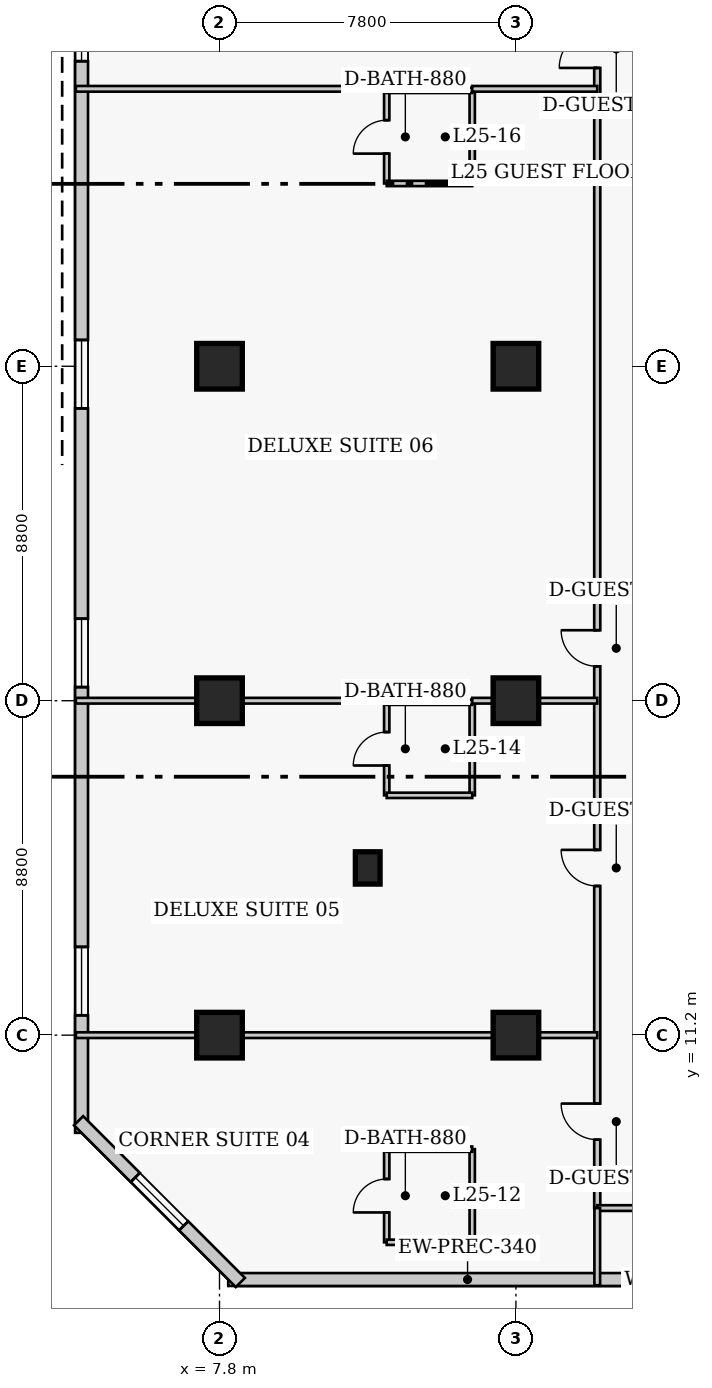
"""IFC4 building model, lengths in metres.
Left out: names, types, materials, properties, quantities, classifications, styles, units other than length and angle.
Written with IfcOpenShell. Run it as: python <this file> out.ifc"""

import sys

from ifc_helpers import new_model, si_unit, direction, frame, frame_2d, origin, origin_2d, place, context, subcontext, project, spatial, rectangle, extrude, element, fill, save


model = new_model("IFC4")
c1 = context("Model", 3, precision=1e-05, world=origin(), true_north=direction((0.0, 1.0)))
c2 = subcontext(c1, "Body", "Model", "MODEL_VIEW")
j1 = project(units=[si_unit("LENGTHUNIT", "METRE"), si_unit("PLANEANGLEUNIT", "RADIAN")], contexts=[c1])
p1 = place(None, origin())
s1 = spatial("IfcSite", under=j1, at=p1, CompositionType="ELEMENT")
p2 = place(p1, origin())
s2 = spatial("IfcBuilding", under=s1, at=p2, CompositionType="ELEMENT")
p3 = place(p2, frame((0.0, 0.0, 103.2)))
s3 = spatial("IfcBuildingStorey", under=s2, at=p3, CompositionType="ELEMENT", Elevation=103.2)
for number, where, z_axis, x_axis in (
    (1, (7.8, 11.2, 0.0), (0.0, 0.0, 1.0), (1.0, 0.0, 0.0)),
    (2, (7.8, 20.0, 0.0), (0.0, 0.0, 1.0), (1.0, 0.0, 0.0)),
    (3, (7.8, 28.8, 0.0), (0.0, 0.0, 1.0), (1.0, 0.0, 0.0)),
    (4, (15.6, 11.2, 0.0), (0.0, 0.0, 1.0), (1.0, 0.0, 0.0)),
    (5, (15.6, 20.0, 0.0), (0.0, 0.0, 1.0), (1.0, 0.0, 0.0)),
    (6, (15.6, 28.8, 0.0), (0.0, 0.0, 1.0), (1.0, 0.0, 0.0)),
):
    element("IfcColumn", number, at=place(p3, frame(where, z_axis=z_axis, x_axis=x_axis)), inside=s3, PredefinedType="COLUMN", context=c2, shape_type="SweptSolid", body=[
        extrude(rectangle(XDim=1.2, YDim=1.2, at=origin_2d()), origin(), (0.0, 0.0, 1.0), 3.8),
    ])
p4 = place(p3, frame((11.7, 15.6, 0.0), z_axis=(0.0, 0.0, 1.0), x_axis=(1.0, 0.0, 0.0)))
e7 = element("IfcColumn", 7, at=p4, inside=s3, PredefinedType="PILASTER", context=c2, shape_type="SweptSolid", body=[
    extrude(rectangle(XDim=0.65, YDim=0.85, at=origin_2d()), origin(), (0.0, 0.0, 1.0), 3.8),
])
p5 = place(p3, frame((8.03, 4.77, 0.0), z_axis=(0.0, 0.0, 1.0), x_axis=(1.0, 0.0, 0.0)))
e8 = element("IfcWall", 8, at=p5, inside=s3, PredefinedType="SOLIDWALL", context=c2, shape_type="SweptSolid", body=[
    extrude(rectangle(XDim=28.29, YDim=0.34, at=frame_2d((14.145, 0.0))), origin(), (0.0, 0.0, 1.0), 3.54),
])
p6 = place(p5, frame((18.57, 0.0, 0.0)))
e9 = element("IfcOpeningElement", 9, at=p6, cuts=e8, PredefinedType="OPENING", context=c2, shape_type="SweptSolid", body=[
    extrude(rectangle(XDim=1.4, YDim=2.15, at=frame_2d((0.7, 1.075))), frame((0.0, 0.18, 0.0), z_axis=(0.0, -1.0, 0.0), x_axis=(1.0, 0.0, 0.0)), (0.0, 0.0, 1.0), 0.36),
])
p7 = place(p5, frame((12.595, 0.0, 0.85)))
e10 = element("IfcOpeningElement", 10, at=p7, cuts=e8, PredefinedType="OPENING", context=c2, shape_type="SweptSolid", body=[
    extrude(rectangle(XDim=1.8, YDim=1.8, at=frame_2d((0.9, 0.9))), frame((0.0, 0.18, 0.0), z_axis=(0.0, -1.0, 0.0), x_axis=(1.0, 0.0, 0.0)), (0.0, 0.0, 1.0), 0.36),
])
p8 = place(p3, frame((4.17, 40.57, 0.0), z_axis=(0.0, 0.0, 1.0), x_axis=(0.0, -1.0, 0.0)))
e11 = element("IfcWall", 11, at=p8, inside=s3, PredefinedType="SOLIDWALL", context=c2, shape_type="SweptSolid", body=[
    extrude(rectangle(XDim=31.94, YDim=0.34, at=frame_2d((15.97, 0.0))), origin(), (0.0, 0.0, 1.0), 3.54),
])
p9 = place(p8, frame((1.942, 0.0, 0.85)))
e12 = element("IfcOpeningElement", 12, at=p9, cuts=e11, PredefinedType="OPENING", context=c2, shape_type="SweptSolid", body=[
    extrude(rectangle(XDim=1.8, YDim=1.8, at=frame_2d((0.9, 0.9))), frame((0.0, 0.18, 0.0), z_axis=(0.0, -1.0, 0.0), x_axis=(1.0, 0.0, 0.0)), (0.0, 0.0, 1.0), 0.36),
])
p10 = place(p8, frame((11.077, 0.0, 0.85)))
e13 = element("IfcOpeningElement", 13, at=p10, cuts=e11, PredefinedType="OPENING", context=c2, shape_type="SweptSolid", body=[
    extrude(rectangle(XDim=1.8, YDim=1.8, at=frame_2d((0.9, 0.9))), frame((0.0, 0.18, 0.0), z_axis=(0.0, -1.0, 0.0), x_axis=(1.0, 0.0, 0.0)), (0.0, 0.0, 1.0), 0.36),
])
p11 = place(p8, frame((18.413, 0.0, 0.85)))
e14 = element("IfcOpeningElement", 14, at=p11, cuts=e11, PredefinedType="OPENING", context=c2, shape_type="SweptSolid", body=[
    extrude(rectangle(XDim=1.8, YDim=1.8, at=frame_2d((0.9, 0.9))), frame((0.0, 0.18, 0.0), z_axis=(0.0, -1.0, 0.0), x_axis=(1.0, 0.0, 0.0)), (0.0, 0.0, 1.0), 0.36),
])
p12 = place(p8, frame((27.048, 0.0, 0.85)))
e15 = element("IfcOpeningElement", 15, at=p12, cuts=e11, PredefinedType="OPENING", context=c2, shape_type="SweptSolid", body=[
    extrude(rectangle(XDim=1.8, YDim=1.8, at=frame_2d((0.9, 0.9))), frame((0.0, 0.18, 0.0), z_axis=(0.0, -1.0, 0.0), x_axis=(1.0, 0.0, 0.0)), (0.0, 0.0, 1.0), 0.36),
])
p13 = place(p3, frame((4.092, 8.948, 0.0), z_axis=(0.0, 0.0, 1.0), x_axis=(0.707106781187, -0.707106781187, 0.0)))
e16 = element("IfcWall", 16, at=p13, inside=s3, PredefinedType="SOLIDWALL", context=c2, shape_type="SweptSolid", body=[
    extrude(rectangle(XDim=6.02, YDim=0.34, at=frame_2d((3.01, 0.0))), origin(), (0.0, 0.0, 1.0), 3.54),
])
p14 = place(p13, frame((2.11, 0.0, 0.85)))
e17 = element("IfcOpeningElement", 17, at=p14, cuts=e16, PredefinedType="OPENING", context=c2, shape_type="SweptSolid", body=[
    extrude(rectangle(XDim=1.8, YDim=1.8, at=frame_2d((0.9, 0.9))), frame((0.0, 0.18, 0.0), z_axis=(0.0, -1.0, 0.0), x_axis=(1.0, 0.0, 0.0)), (0.0, 0.0, 1.0), 0.36),
])
p15 = place(p3, frame((17.74, 6.65, 0.0), z_axis=(0.0, 0.0, 1.0), x_axis=(0.0, 1.0, 0.0)))
e18 = element("IfcWall", 18, at=p15, inside=s3, PredefinedType="PARTITIONING", context=c2, shape_type="SweptSolid", body=[
    extrude(rectangle(XDim=34.0, YDim=0.16, at=frame_2d((17.0, 0.0))), origin(), (0.0, 0.0, 1.0), 3.54),
])
p16 = place(p15, frame((1.8, 0.0, 0.0)))
e19 = element("IfcOpeningElement", 19, at=p16, cuts=e18, PredefinedType="OPENING", context=c2, shape_type="SweptSolid", body=[
    extrude(rectangle(XDim=0.95, YDim=2.1, at=frame_2d((0.475, 1.05))), frame((0.0, 0.09, 0.0), z_axis=(0.0, -1.0, 0.0), x_axis=(1.0, 0.0, 0.0)), (0.0, 0.0, 1.0), 0.18),
])
p17 = place(p15, frame((8.475, 0.0, 0.0)))
e20 = element("IfcOpeningElement", 20, at=p17, cuts=e18, PredefinedType="OPENING", context=c2, shape_type="SweptSolid", body=[
    extrude(rectangle(XDim=0.95, YDim=2.1, at=frame_2d((0.475, 1.05))), frame((0.0, 0.09, 0.0), z_axis=(0.0, -1.0, 0.0), x_axis=(1.0, 0.0, 0.0)), (0.0, 0.0, 1.0), 0.18),
])
p18 = place(p15, frame((14.255, 0.0, 0.0)))
e21 = element("IfcOpeningElement", 21, at=p18, cuts=e18, PredefinedType="OPENING", context=c2, shape_type="SweptSolid", body=[
    extrude(rectangle(XDim=0.95, YDim=2.1, at=frame_2d((0.475, 1.05))), frame((0.0, 0.09, 0.0), z_axis=(0.0, -1.0, 0.0), x_axis=(1.0, 0.0, 0.0)), (0.0, 0.0, 1.0), 0.18),
])
p19 = place(p15, frame((30.0, 0.0, 0.0)))
e22 = element("IfcOpeningElement", 22, at=p19, cuts=e18, PredefinedType="OPENING", context=c2, shape_type="SweptSolid", body=[
    extrude(rectangle(XDim=1.0, YDim=2.15, at=frame_2d((0.5, 1.075))), frame((0.0, 0.09, 0.0), z_axis=(0.0, -1.0, 0.0), x_axis=(1.0, 0.0, 0.0)), (0.0, 0.0, 1.0), 0.18),
])
p20 = place(p3, frame((17.74, 6.65, 0.0), z_axis=(0.0, 0.0, 1.0), x_axis=(1.0, 0.0, 0.0)))
e23 = element("IfcWall", 23, at=p20, inside=s3, PredefinedType="PARTITIONING", context=c2, shape_type="SweptSolid", body=[
    extrude(rectangle(XDim=2.22, YDim=0.15, at=frame_2d((1.11, 0.0))), origin(), (0.0, 0.0, 1.0), 3.54),
])
p21 = place(p3, frame((17.74, 4.62, 0.0), z_axis=(0.0, 0.0, 1.0), x_axis=(0.0, 1.0, 0.0)))
e24 = element("IfcWall", 24, at=p21, inside=s3, PredefinedType="PARTITIONING", context=c2, shape_type="SweptSolid", body=[
    extrude(rectangle(XDim=2.03, YDim=0.15, at=frame_2d((1.015, 0.0))), origin(), (0.0, 0.0, 1.0), 3.54),
])
p22 = place(p3, frame((12.2, 5.75, 0.0), z_axis=(0.0, 0.0, 1.0), x_axis=(0.0, 1.0, 0.0)))
e25 = element("IfcWall", 25, at=p22, inside=s3, PredefinedType="PLUMBINGWALL", context=c2, shape_type="SweptSolid", body=[
    extrude(rectangle(XDim=2.45, YDim=0.14, at=frame_2d((1.225, 0.0))), origin(), (0.0, 0.0, 1.0), 3.54),
])
p23 = place(p22, frame((0.785, 0.0, 0.0)))
e26 = element("IfcOpeningElement", 26, at=p23, cuts=e25, PredefinedType="OPENING", context=c2, shape_type="SweptSolid", body=[
    extrude(rectangle(XDim=0.88, YDim=2.05, at=frame_2d((0.44, 1.025))), frame((0.0, 0.08, 0.0), z_axis=(0.0, -1.0, 0.0), x_axis=(1.0, 0.0, 0.0)), (0.0, 0.0, 1.0), 0.16),
])
p24 = place(p3, frame((14.45, 5.75, 0.0), z_axis=(0.0, 0.0, 1.0), x_axis=(0.0, 1.0, 0.0)))
e27 = element("IfcWall", 27, at=p24, inside=s3, PredefinedType="PLUMBINGWALL", context=c2, shape_type="SweptSolid", body=[
    extrude(rectangle(XDim=2.45, YDim=0.14, at=frame_2d((1.225, 0.0))), origin(), (0.0, 0.0, 1.0), 3.54),
])
for number, where, z_axis, x_axis in (
    (28, (12.2, 5.75, 0.0), (0.0, 0.0, 1.0), (1.0, 0.0, 0.0)),
    (29, (12.2, 8.2, 0.0), (0.0, 0.0, 1.0), (1.0, 0.0, 0.0)),
):
    element("IfcWall", number, at=place(p3, frame(where, z_axis=z_axis, x_axis=x_axis)), inside=s3, PredefinedType="PLUMBINGWALL", context=c2, shape_type="SweptSolid", body=[
        extrude(rectangle(XDim=2.25, YDim=0.14, at=frame_2d((1.125, 0.0))), origin(), (0.0, 0.0, 1.0), 3.54),
    ])
p25 = place(p3, frame((4.02, 11.2, 0.0), z_axis=(0.0, 0.0, 1.0), x_axis=(1.0, 0.0, 0.0)))
e30 = element("IfcWall", 30, at=p25, inside=s3, PredefinedType="PARTITIONING", context=c2, shape_type="SweptSolid", body=[
    extrude(rectangle(XDim=13.72, YDim=0.15, at=frame_2d((6.86, 0.0))), origin(), (0.0, 0.0, 1.0), 2.679),
])
p26 = place(p3, frame((12.2, 17.51, 0.0), z_axis=(0.0, 0.0, 1.0), x_axis=(0.0, 1.0, 0.0)))
e31 = element("IfcWall", 31, at=p26, inside=s3, PredefinedType="PLUMBINGWALL", context=c2, shape_type="SweptSolid", body=[
    extrude(rectangle(XDim=2.45, YDim=0.14, at=frame_2d((1.225, 0.0))), origin(), (0.0, 0.0, 1.0), 3.54),
])
p27 = place(p26, frame((0.785, 0.0, 0.0)))
e32 = element("IfcOpeningElement", 32, at=p27, cuts=e31, PredefinedType="OPENING", context=c2, shape_type="SweptSolid", body=[
    extrude(rectangle(XDim=0.88, YDim=2.05, at=frame_2d((0.44, 1.025))), frame((0.0, 0.08, 0.0), z_axis=(0.0, -1.0, 0.0), x_axis=(1.0, 0.0, 0.0)), (0.0, 0.0, 1.0), 0.16),
])
p28 = place(p3, frame((14.45, 17.51, 0.0), z_axis=(0.0, 0.0, 1.0), x_axis=(0.0, 1.0, 0.0)))
e33 = element("IfcWall", 33, at=p28, inside=s3, PredefinedType="PLUMBINGWALL", context=c2, shape_type="SweptSolid", body=[
    extrude(rectangle(XDim=2.45, YDim=0.14, at=frame_2d((1.225, 0.0))), origin(), (0.0, 0.0, 1.0), 3.54),
])
p29 = place(p3, frame((12.2, 17.51, 0.0), z_axis=(0.0, 0.0, 1.0), x_axis=(1.0, 0.0, 0.0)))
e34 = element("IfcWall", 34, at=p29, inside=s3, PredefinedType="PLUMBINGWALL", context=c2, shape_type="SweptSolid", body=[
    extrude(rectangle(XDim=2.25, YDim=0.14, at=frame_2d((1.125, 0.0))), origin(), (0.0, 0.0, 1.0), 3.54),
])
p30 = place(p3, frame((12.2, 19.96, 0.0), z_axis=(0.0, 0.0, 1.0), x_axis=(1.0, 0.0, 0.0)))
e35 = element("IfcWall", 35, at=p30, inside=s3, PredefinedType="PLUMBINGWALL", context=c2, shape_type="SweptSolid", body=[
    extrude(rectangle(XDim=2.25, YDim=0.14, at=frame_2d((1.125, 0.0))), origin(), (0.0, 0.0, 1.0), 2.679),
])
p31 = place(p3, frame((4.02, 20.0, 0.0), z_axis=(0.0, 0.0, 1.0), x_axis=(1.0, 0.0, 0.0)))
e36 = element("IfcWall", 36, at=p31, inside=s3, PredefinedType="PARTITIONING", context=c2, shape_type="SweptSolid", body=[
    extrude(rectangle(XDim=8.18, YDim=0.15, at=frame_2d((4.09, 0.0))), origin(), (0.0, 0.0, 1.0), 2.679),
])
p32 = place(p3, frame((14.45, 20.0, 0.0), z_axis=(0.0, 0.0, 1.0), x_axis=(1.0, 0.0, 0.0)))
e37 = element("IfcWall", 37, at=p32, inside=s3, PredefinedType="PARTITIONING", context=c2, shape_type="SweptSolid", body=[
    extrude(rectangle(XDim=3.29, YDim=0.15, at=frame_2d((1.645, 0.0))), origin(), (0.0, 0.0, 1.0), 2.679),
])
p33 = place(p3, frame((12.2, 33.61, 0.0), z_axis=(0.0, 0.0, 1.0), x_axis=(0.0, 1.0, 0.0)))
e38 = element("IfcWall", 38, at=p33, inside=s3, PredefinedType="PLUMBINGWALL", context=c2, shape_type="SweptSolid", body=[
    extrude(rectangle(XDim=2.45, YDim=0.14, at=frame_2d((1.225, 0.0))), origin(), (0.0, 0.0, 1.0), 3.54),
])
p34 = place(p33, frame((0.785, 0.0, 0.0)))
e39 = element("IfcOpeningElement", 39, at=p34, cuts=e38, PredefinedType="OPENING", context=c2, shape_type="SweptSolid", body=[
    extrude(rectangle(XDim=0.88, YDim=2.05, at=frame_2d((0.44, 1.025))), frame((0.0, 0.08, 0.0), z_axis=(0.0, -1.0, 0.0), x_axis=(1.0, 0.0, 0.0)), (0.0, 0.0, 1.0), 0.16),
])
p35 = place(p3, frame((14.45, 33.61, 0.0), z_axis=(0.0, 0.0, 1.0), x_axis=(0.0, 1.0, 0.0)))
e40 = element("IfcWall", 40, at=p35, inside=s3, PredefinedType="PLUMBINGWALL", context=c2, shape_type="SweptSolid", body=[
    extrude(rectangle(XDim=2.45, YDim=0.14, at=frame_2d((1.225, 0.0))), origin(), (0.0, 0.0, 1.0), 3.54),
])
for number, where, z_axis, x_axis in (
    (41, (12.2, 33.61, 0.0), (0.0, 0.0, 1.0), (1.0, 0.0, 0.0)),
    (42, (12.2, 36.06, 0.0), (0.0, 0.0, 1.0), (1.0, 0.0, 0.0)),
):
    element("IfcWall", number, at=place(p3, frame(where, z_axis=z_axis, x_axis=x_axis)), inside=s3, PredefinedType="PLUMBINGWALL", context=c2, shape_type="SweptSolid", body=[
        extrude(rectangle(XDim=2.25, YDim=0.14, at=frame_2d((1.125, 0.0))), origin(), (0.0, 0.0, 1.0), 3.54),
    ])
p36 = place(p3, frame((4.02, 36.1, 0.0), z_axis=(0.0, 0.0, 1.0), x_axis=(1.0, 0.0, 0.0)))
e43 = element("IfcWall", 43, at=p36, inside=s3, PredefinedType="PARTITIONING", context=c2, shape_type="SweptSolid", body=[
    extrude(rectangle(XDim=8.18, YDim=0.15, at=frame_2d((4.09, 0.0))), origin(), (0.0, 0.0, 1.0), 3.54),
])
p37 = place(p3, frame((14.45, 36.1, 0.0), z_axis=(0.0, 0.0, 1.0), x_axis=(1.0, 0.0, 0.0)))
e44 = element("IfcWall", 44, at=p37, inside=s3, PredefinedType="PARTITIONING", context=c2, shape_type="SweptSolid", body=[
    extrude(rectangle(XDim=3.29, YDim=0.15, at=frame_2d((1.645, 0.0))), origin(), (0.0, 0.0, 1.0), 3.54),
])
p38 = place(p9, origin())
e45 = element("IfcWindow", 45, at=p38, inside=s3, PartitioningType="SINGLE_PANEL", PredefinedType="WINDOW", context=c2, shape_type="SweptSolid", body=[
    extrude(rectangle(XDim=1.8, YDim=1.8, at=frame_2d((0.9, 0.9))), frame((0.0, 0.03, 0.0), z_axis=(0.0, -1.0, 0.0), x_axis=(1.0, 0.0, 0.0)), (0.0, 0.0, 1.0), 0.06),
])
fill(e12, e45)
p39 = place(p10, origin())
e46 = element("IfcWindow", 46, at=p39, inside=s3, PartitioningType="SINGLE_PANEL", PredefinedType="WINDOW", context=c2, shape_type="SweptSolid", body=[
    extrude(rectangle(XDim=1.8, YDim=1.8, at=frame_2d((0.9, 0.9))), frame((0.0, 0.03, 0.0), z_axis=(0.0, -1.0, 0.0), x_axis=(1.0, 0.0, 0.0)), (0.0, 0.0, 1.0), 0.06),
])
fill(e13, e46)
p40 = place(p11, origin())
e47 = element("IfcWindow", 47, at=p40, inside=s3, PartitioningType="SINGLE_PANEL", PredefinedType="WINDOW", context=c2, shape_type="SweptSolid", body=[
    extrude(rectangle(XDim=1.8, YDim=1.8, at=frame_2d((0.9, 0.9))), frame((0.0, 0.03, 0.0), z_axis=(0.0, -1.0, 0.0), x_axis=(1.0, 0.0, 0.0)), (0.0, 0.0, 1.0), 0.06),
])
fill(e14, e47)
p41 = place(p12, origin())
e48 = element("IfcWindow", 48, at=p41, inside=s3, PartitioningType="SINGLE_PANEL", PredefinedType="WINDOW", context=c2, shape_type="SweptSolid", body=[
    extrude(rectangle(XDim=1.8, YDim=1.8, at=frame_2d((0.9, 0.9))), frame((0.0, 0.03, 0.0), z_axis=(0.0, -1.0, 0.0), x_axis=(1.0, 0.0, 0.0)), (0.0, 0.0, 1.0), 0.06),
])
fill(e15, e48)
p42 = place(p14, origin())
e49 = element("IfcWindow", 49, at=p42, inside=s3, PartitioningType="SINGLE_PANEL", PredefinedType="WINDOW", context=c2, shape_type="SweptSolid", body=[
    extrude(rectangle(XDim=1.8, YDim=1.8, at=frame_2d((0.9, 0.9))), frame((0.0, 0.03, 0.0), z_axis=(0.0, -1.0, 0.0), x_axis=(1.0, 0.0, 0.0)), (0.0, 0.0, 1.0), 0.06),
])
fill(e17, e49)
p43 = place(p23, origin())
e50 = element("IfcDoor", 50, at=p43, inside=s3, OperationType="SINGLE_SWING_LEFT", PredefinedType="DOOR", context=c2, shape_type="SweptSolid", body=[
    extrude(rectangle(XDim=0.88, YDim=2.05, at=frame_2d((0.44, 1.025))), frame((0.0, 0.025, 0.0), z_axis=(0.0, -1.0, 0.0), x_axis=(1.0, 0.0, 0.0)), (0.0, 0.0, 1.0), 0.05),
])
fill(e26, e50)
p44 = place(p16, origin())
e51 = element("IfcDoor", 51, at=p44, inside=s3, OperationType="SINGLE_SWING_RIGHT", PredefinedType="DOOR", context=c2, shape_type="SweptSolid", body=[
    extrude(rectangle(XDim=0.95, YDim=2.1, at=frame_2d((0.475, 1.05))), frame((0.0, 0.025, 0.0), z_axis=(0.0, -1.0, 0.0), x_axis=(1.0, 0.0, 0.0)), (0.0, 0.0, 1.0), 0.05),
])
fill(e19, e51)
p45 = place(p27, origin())
e52 = element("IfcDoor", 52, at=p45, inside=s3, OperationType="SINGLE_SWING_LEFT", PredefinedType="DOOR", context=c2, shape_type="SweptSolid", body=[
    extrude(rectangle(XDim=0.88, YDim=2.05, at=frame_2d((0.44, 1.025))), frame((0.0, 0.025, 0.0), z_axis=(0.0, -1.0, 0.0), x_axis=(1.0, 0.0, 0.0)), (0.0, 0.0, 1.0), 0.05),
])
fill(e32, e52)
p46 = place(p17, origin())
e53 = element("IfcDoor", 53, at=p46, inside=s3, OperationType="SINGLE_SWING_RIGHT", PredefinedType="DOOR", context=c2, shape_type="SweptSolid", body=[
    extrude(rectangle(XDim=0.95, YDim=2.1, at=frame_2d((0.475, 1.05))), frame((0.0, 0.025, 0.0), z_axis=(0.0, -1.0, 0.0), x_axis=(1.0, 0.0, 0.0)), (0.0, 0.0, 1.0), 0.05),
])
fill(e20, e53)
p47 = place(p34, origin())
e54 = element("IfcDoor", 54, at=p47, inside=s3, OperationType="SINGLE_SWING_LEFT", PredefinedType="DOOR", context=c2, shape_type="SweptSolid", body=[
    extrude(rectangle(XDim=0.88, YDim=2.05, at=frame_2d((0.44, 1.025))), frame((0.0, 0.025, 0.0), z_axis=(0.0, -1.0, 0.0), x_axis=(1.0, 0.0, 0.0)), (0.0, 0.0, 1.0), 0.05),
])
fill(e39, e54)
p48 = place(p18, origin())
e55 = element("IfcDoor", 55, at=p48, inside=s3, OperationType="SINGLE_SWING_RIGHT", PredefinedType="DOOR", context=c2, shape_type="SweptSolid", body=[
    extrude(rectangle(XDim=0.95, YDim=2.1, at=frame_2d((0.475, 1.05))), frame((0.0, 0.025, 0.0), z_axis=(0.0, -1.0, 0.0), x_axis=(1.0, 0.0, 0.0)), (0.0, 0.0, 1.0), 0.05),
])
fill(e21, e55)
p49 = place(p19, origin())
e56 = element("IfcDoor", 56, at=p49, inside=s3, OperationType="SINGLE_SWING_LEFT", PredefinedType="DOOR", context=c2, shape_type="SweptSolid", body=[
    extrude(rectangle(XDim=1.0, YDim=2.15, at=frame_2d((0.5, 1.075))), frame((0.0, 0.025, 0.0), z_axis=(0.0, -1.0, 0.0), x_axis=(1.0, 0.0, 0.0)), (0.0, 0.0, 1.0), 0.05),
])
fill(e22, e56)
save(model, sys.argv[1])
